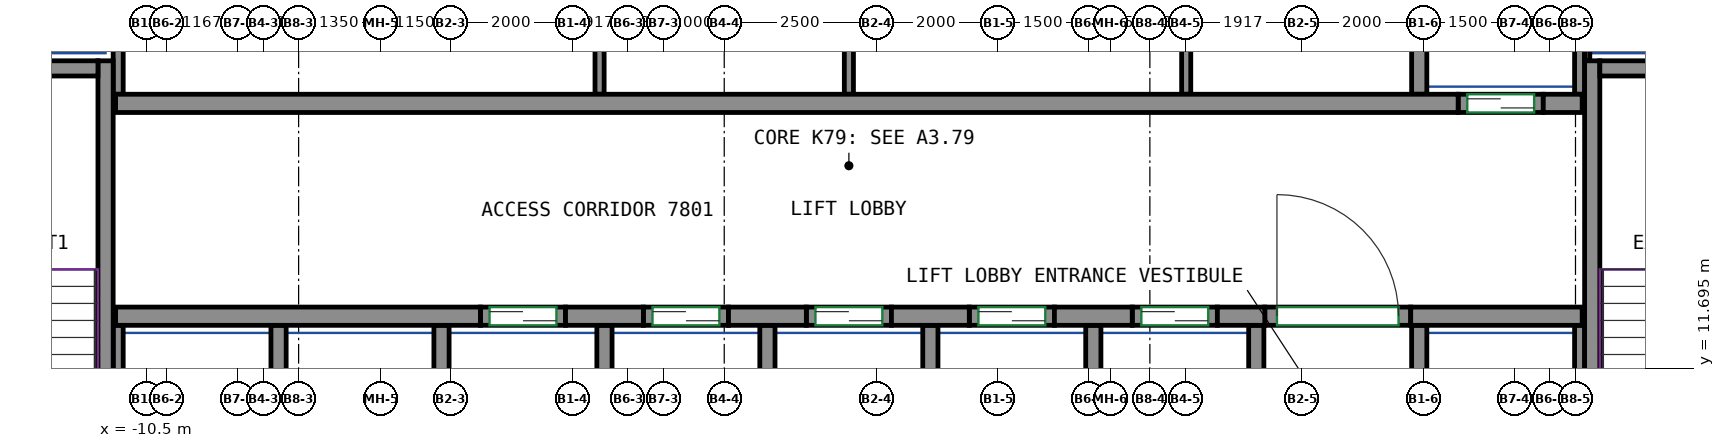
"""IFC4 building model, lengths in metres.
Left out: names, types, materials, properties, quantities, classifications, styles, units other than length and angle.
Written with IfcOpenShell. Run it as: python <this file> out.ifc"""

import sys

from ifc_helpers import new_model, si_unit, direction, frame, frame_2d, origin, place, context, subcontext, project, spatial, rectangle, extrude, source, transform, mapped, element, fill, save


model = new_model("IFC4")
c1 = context("Model", 3, precision=1e-05, world=origin(), true_north=direction((0.0, 1.0)))
c2 = subcontext(c1, "Body", "Model", "MODEL_VIEW")
j1 = project(units=[si_unit("LENGTHUNIT", "METRE"), si_unit("PLANEANGLEUNIT", "RADIAN")], contexts=[c1])
p1 = place(None, origin())
s1 = spatial("IfcSite", under=j1, at=p1, CompositionType="ELEMENT")
p2 = place(p1, origin())
s2 = spatial("IfcBuilding", under=s1, at=p2, CompositionType="ELEMENT")
p3 = place(p2, frame((0.0, 0.0, 312.0)))
s3 = spatial("IfcBuildingStorey", under=s2, at=p3, CompositionType="ELEMENT", Elevation=312.0)
m1 = source(origin(), c2, "Body", "SweptSolid", [
    extrude(rectangle(XDim=7.75, YDim=0.25, at=frame_2d((3.875, 0.0))), origin(), (0.0, 0.0, 1.0), 3.12),
])
p4 = place(p3, frame((-11.175, 9.0, 0.0), z_axis=(0.0, 0.0, 1.0), x_axis=(0.0, 1.0, 0.0)))
e1 = element("IfcWall", 1, at=p4, inside=s3, PredefinedType="SHEAR", context=c2, shape_type="MappedRepresentation", body=[
    mapped(m1, transform((0.0, 0.0, 0.0))),
])
m2 = source(origin(), c2, "Body", "SweptSolid", [
    extrude(rectangle(XDim=3.7, YDim=0.25, at=frame_2d((1.85, 0.0))), origin(), (0.0, 0.0, 1.0), 3.12),
])
p5 = place(p3, frame((-15.0, 16.625, 0.0), z_axis=(0.0, 0.0, 1.0), x_axis=(1.0, 0.0, 0.0)))
e2 = element("IfcWall", 2, at=p5, inside=s3, PredefinedType="SHEAR", context=c2, shape_type="MappedRepresentation", body=[
    mapped(m2, transform((0.0, 0.0, 0.0))),
])
p6 = place(p3, frame((13.275, 9.0, 0.0), z_axis=(0.0, 0.0, 1.0), x_axis=(0.0, 1.0, 0.0)))
e3 = element("IfcWall", 3, at=p6, inside=s3, PredefinedType="SHEAR", context=c2, shape_type="MappedRepresentation", body=[
    mapped(m1, transform((0.0, 0.0, 0.0))),
])
m3 = source(origin(), c2, "Body", "SweptSolid", [
    extrude(rectangle(XDim=3.7, YDim=0.25, at=frame_2d((1.85, 0.0))), origin(), (0.0, 0.0, 1.0), 3.12),
])
p7 = place(p3, frame((13.4, 16.625, 0.0), z_axis=(0.0, 0.0, 1.0), x_axis=(1.0, 0.0, 0.0)))
e4 = element("IfcWall", 4, at=p7, inside=s3, PredefinedType="SHEAR", context=c2, shape_type="MappedRepresentation", body=[
    mapped(m3, transform((0.0, 0.0, 0.0))),
])
m4 = source(origin(), c2, "Body", "SweptSolid", [
    extrude(rectangle(XDim=6.0, YDim=0.3, at=frame_2d((3.0, 0.0))), origin(), (0.0, 0.0, 1.0), 3.12),
])
p8 = place(p3, frame((-11.01, 12.55, 0.0), z_axis=(0.0, 0.0, 1.0), x_axis=(1.0, 0.0, 0.0)))
e5 = element("IfcWall", 5, at=p8, inside=s3, PredefinedType="SHEAR", context=c2, shape_type="MappedRepresentation", body=[
    mapped(m4, transform((0.0, 0.0, 0.0))),
])
m5 = source(origin(), c2, "Body", "SweptSolid", [
    extrude(rectangle(XDim=1.28, YDim=0.3, at=frame_2d((0.64, 0.0))), origin(), (0.0, 0.0, 1.0), 3.12),
])
for number, where, z_axis, x_axis in (
    (6, (-3.61, 12.55, 0.0), (0.0, 0.0, 1.0), (1.0, 0.0, 0.0)),
    (7, (-0.93, 12.55, 0.0), (0.0, 0.0, 1.0), (1.0, 0.0, 0.0)),
    (8, (1.75, 12.55, 0.0), (0.0, 0.0, 1.0), (1.0, 0.0, 0.0)),
    (9, (4.43, 12.55, 0.0), (0.0, 0.0, 1.0), (1.0, 0.0, 0.0)),
):
    element("IfcWall", number, at=place(p3, frame(where, z_axis=z_axis, x_axis=x_axis)), inside=s3, PredefinedType="SHEAR", context=c2, shape_type="MappedRepresentation", body=[
        mapped(m5, transform((0.0, 0.0, 0.0))),
    ])
m6 = source(origin(), c2, "Body", "SweptSolid", [
    extrude(rectangle(XDim=0.78, YDim=0.3, at=frame_2d((0.39, 0.0))), origin(), (0.0, 0.0, 1.0), 3.12),
])
p9 = place(p3, frame((7.11, 12.55, 0.0), z_axis=(0.0, 0.0, 1.0), x_axis=(1.0, 0.0, 0.0)))
e10 = element("IfcWall", 10, at=p9, inside=s3, PredefinedType="SHEAR", context=c2, shape_type="MappedRepresentation", body=[
    mapped(m6, transform((0.0, 0.0, 0.0))),
])
m7 = source(origin(), c2, "Body", "SweptSolid", [
    extrude(rectangle(XDim=2.82, YDim=0.3, at=frame_2d((1.41, 0.0))), origin(), (0.0, 0.0, 1.0), 3.12),
])
p10 = place(p3, frame((10.29, 12.55, 0.0), z_axis=(0.0, 0.0, 1.0), x_axis=(1.0, 0.0, 0.0)))
e11 = element("IfcWall", 11, at=p10, inside=s3, PredefinedType="SHEAR", context=c2, shape_type="MappedRepresentation", body=[
    mapped(m7, transform((0.0, 0.0, 0.0))),
])
m8 = source(origin(), c2, "Body", "SweptSolid", [
    extrude(rectangle(XDim=22.08, YDim=0.3, at=frame_2d((11.04, 0.0))), origin(), (0.0, 0.0, 1.0), 3.12),
])
p11 = place(p3, frame((-11.01, 16.05, 0.0), z_axis=(0.0, 0.0, 1.0), x_axis=(1.0, 0.0, 0.0)))
e12 = element("IfcWall", 12, at=p11, inside=s3, PredefinedType="SHEAR", context=c2, shape_type="MappedRepresentation", body=[
    mapped(m8, transform((0.0, 0.0, 0.0))),
])
m9 = source(origin(), c2, "Body", "SweptSolid", [
    extrude(rectangle(XDim=0.64, YDim=0.3, at=frame_2d((0.32, 0.0))), origin(), (0.0, 0.0, 1.0), 3.12),
])
p12 = place(p3, frame((12.47, 16.05, 0.0), z_axis=(0.0, 0.0, 1.0), x_axis=(1.0, 0.0, 0.0)))
e13 = element("IfcWall", 13, at=p12, inside=s3, PredefinedType="SHEAR", context=c2, shape_type="MappedRepresentation", body=[
    mapped(m9, transform((0.0, 0.0, 0.0))),
])
m10 = source(origin(), c2, "Body", "SweptSolid", [
    extrude(rectangle(XDim=1.4, YDim=0.3, at=frame_2d((0.7, 0.0))), origin(), (0.0, 0.0, 1.0), 3.12),
])
p13 = place(p3, frame((-5.01, 12.55, 0.0), z_axis=(0.0, 0.0, 1.0), x_axis=(1.0, 0.0, 0.0)))
e14 = element("IfcWall", 14, at=p13, inside=s3, PredefinedType="PARTITIONING", context=c2, shape_type="MappedRepresentation", body=[
    mapped(m10, transform((0.0, 0.0, 0.0))),
])
p14 = place(p13, frame((0.15, 0.0, 0.0)))
e15 = element("IfcOpeningElement", 15, at=p14, cuts=e14, PredefinedType="OPENING", context=c2, shape_type="SweptSolid", body=[
    extrude(rectangle(XDim=1.1, YDim=2.1, at=frame_2d((0.55, 1.05))), frame((0.0, 0.16, 0.0), z_axis=(0.0, -1.0, 0.0), x_axis=(1.0, 0.0, 0.0)), (0.0, 0.0, 1.0), 0.32),
])
m11 = source(origin(), c2, "Body", "SweptSolid", [
    extrude(rectangle(XDim=1.4, YDim=0.3, at=frame_2d((0.7, 0.0))), origin(), (0.0, 0.0, 1.0), 3.12),
])
p15 = place(p3, frame((-2.33, 12.55, 0.0), z_axis=(0.0, 0.0, 1.0), x_axis=(1.0, 0.0, 0.0)))
e16 = element("IfcWall", 16, at=p15, inside=s3, PredefinedType="PARTITIONING", context=c2, shape_type="MappedRepresentation", body=[
    mapped(m11, transform((0.0, 0.0, 0.0))),
])
p16 = place(p15, frame((0.15, 0.0, 0.0)))
e17 = element("IfcOpeningElement", 17, at=p16, cuts=e16, PredefinedType="OPENING", context=c2, shape_type="SweptSolid", body=[
    extrude(rectangle(XDim=1.1, YDim=2.1, at=frame_2d((0.55, 1.05))), frame((0.0, 0.16, 0.0), z_axis=(0.0, -1.0, 0.0), x_axis=(1.0, 0.0, 0.0)), (0.0, 0.0, 1.0), 0.32),
])
p17 = place(p3, frame((0.35, 12.55, 0.0), z_axis=(0.0, 0.0, 1.0), x_axis=(1.0, 0.0, 0.0)))
e18 = element("IfcWall", 18, at=p17, inside=s3, PredefinedType="PARTITIONING", context=c2, shape_type="MappedRepresentation", body=[
    mapped(m10, transform((0.0, 0.0, 0.0))),
])
p18 = place(p17, frame((0.15, 0.0, 0.0)))
e19 = element("IfcOpeningElement", 19, at=p18, cuts=e18, PredefinedType="OPENING", context=c2, shape_type="SweptSolid", body=[
    extrude(rectangle(XDim=1.1, YDim=2.1, at=frame_2d((0.55, 1.05))), frame((0.0, 0.16, 0.0), z_axis=(0.0, -1.0, 0.0), x_axis=(1.0, 0.0, 0.0)), (0.0, 0.0, 1.0), 0.32),
])
p19 = place(p3, frame((3.03, 12.55, 0.0), z_axis=(0.0, 0.0, 1.0), x_axis=(1.0, 0.0, 0.0)))
e20 = element("IfcWall", 20, at=p19, inside=s3, PredefinedType="PARTITIONING", context=c2, shape_type="MappedRepresentation", body=[
    mapped(m10, transform((0.0, 0.0, 0.0))),
])
p20 = place(p19, frame((0.15, 0.0, 0.0)))
e21 = element("IfcOpeningElement", 21, at=p20, cuts=e20, PredefinedType="OPENING", context=c2, shape_type="SweptSolid", body=[
    extrude(rectangle(XDim=1.1, YDim=2.1, at=frame_2d((0.55, 1.05))), frame((0.0, 0.16, 0.0), z_axis=(0.0, -1.0, 0.0), x_axis=(1.0, 0.0, 0.0)), (0.0, 0.0, 1.0), 0.32),
])
p21 = place(p3, frame((5.71, 12.55, 0.0), z_axis=(0.0, 0.0, 1.0), x_axis=(1.0, 0.0, 0.0)))
e22 = element("IfcWall", 22, at=p21, inside=s3, PredefinedType="PARTITIONING", context=c2, shape_type="MappedRepresentation", body=[
    mapped(m11, transform((0.0, 0.0, 0.0))),
])
p22 = place(p21, frame((0.15, 0.0, 0.0)))
e23 = element("IfcOpeningElement", 23, at=p22, cuts=e22, PredefinedType="OPENING", context=c2, shape_type="SweptSolid", body=[
    extrude(rectangle(XDim=1.1, YDim=2.1, at=frame_2d((0.55, 1.05))), frame((0.0, 0.16, 0.0), z_axis=(0.0, -1.0, 0.0), x_axis=(1.0, 0.0, 0.0)), (0.0, 0.0, 1.0), 0.32),
])
p23 = place(p3, frame((11.07, 16.05, 0.0), z_axis=(0.0, 0.0, 1.0), x_axis=(1.0, 0.0, 0.0)))
e24 = element("IfcWall", 24, at=p23, inside=s3, PredefinedType="PARTITIONING", context=c2, shape_type="MappedRepresentation", body=[
    mapped(m10, transform((0.0, 0.0, 0.0))),
])
p24 = place(p23, frame((0.15, 0.0, 0.0)))
e25 = element("IfcOpeningElement", 25, at=p24, cuts=e24, PredefinedType="OPENING", context=c2, shape_type="SweptSolid", body=[
    extrude(rectangle(XDim=1.1, YDim=2.1, at=frame_2d((0.55, 1.05))), frame((0.0, 0.16, 0.0), z_axis=(0.0, -1.0, 0.0), x_axis=(1.0, 0.0, 0.0)), (0.0, 0.0, 1.0), 0.32),
])
m12 = source(origin(), c2, "Body", "SweptSolid", [
    extrude(rectangle(XDim=2.4, YDim=0.3, at=frame_2d((1.2, 0.0))), origin(), (0.0, 0.0, 1.0), 3.12),
])
p25 = place(p3, frame((7.89, 12.55, 0.0), z_axis=(0.0, 0.0, 1.0), x_axis=(1.0, 0.0, 0.0)))
e26 = element("IfcWall", 26, at=p25, inside=s3, PredefinedType="PARTITIONING", context=c2, shape_type="MappedRepresentation", body=[
    mapped(m12, transform((0.0, 0.0, 0.0))),
])
p26 = place(p25, frame((0.2, 0.0, 0.0)))
e27 = element("IfcOpeningElement", 27, at=p26, cuts=e26, PredefinedType="OPENING", context=c2, shape_type="SweptSolid", body=[
    extrude(rectangle(XDim=2.0, YDim=2.1, at=frame_2d((1.0, 1.05))), frame((0.0, 0.16, 0.0), z_axis=(0.0, -1.0, 0.0), x_axis=(1.0, 0.0, 0.0)), (0.0, 0.0, 1.0), 0.32),
])
m13 = source(origin(), c2, "Body", "SweptSolid", [
    extrude(rectangle(XDim=3.275, YDim=0.165, at=frame_2d((1.638, 0.0))), origin(), (0.0, 0.0, 1.0), 3.12),
])
p27 = place(p3, frame((13.067, 16.2, 0.0), z_axis=(0.0, 0.0, 1.0), x_axis=(0.0, 1.0, 0.0)))
e28 = element("IfcWall", 28, at=p27, inside=s3, PredefinedType="PARTITIONING", context=c2, shape_type="MappedRepresentation", body=[
    mapped(m13, transform((0.0, 0.0, 0.0))),
])
m14 = source(origin(), c2, "Body", "SweptSolid", [
    extrude(rectangle(XDim=4.8, YDim=0.165, at=frame_2d((2.4, 0.0))), origin(), (0.0, 0.0, 1.0), 3.12),
])
p28 = place(p3, frame((-10.968, 16.2, 0.0), z_axis=(0.0, 0.0, 1.0), x_axis=(0.0, 1.0, 0.0)))
e29 = element("IfcWall", 29, at=p28, inside=s3, PredefinedType="PARTITIONING", context=c2, shape_type="MappedRepresentation", body=[
    mapped(m14, transform((0.0, 0.0, 0.0))),
])
m15 = source(origin(), c2, "Body", "SweptSolid", [
    extrude(rectangle(XDim=3.275, YDim=0.25, at=frame_2d((1.638, 0.0))), origin(), (0.0, 0.0, 1.0), 3.12),
])
p29 = place(p3, frame((10.43, 16.2, 0.0), z_axis=(0.0, 0.0, 1.0), x_axis=(0.0, 1.0, 0.0)))
e30 = element("IfcWall", 30, at=p29, inside=s3, PredefinedType="PARTITIONING", context=c2, shape_type="MappedRepresentation", body=[
    mapped(m15, transform((0.0, 0.0, 0.0))),
])
m16 = source(origin(), c2, "Body", "SweptSolid", [
    extrude(rectangle(XDim=2.725, YDim=0.085, at=frame_2d((1.363, 0.0))), origin(), (0.0, 0.0, 1.0), 3.12),
])
p30 = place(p3, frame((13.192, 16.75, 0.0), z_axis=(0.0, 0.0, 1.0), x_axis=(0.0, 1.0, 0.0)))
e31 = element("IfcWall", 31, at=p30, inside=s3, PredefinedType="PARTITIONING", context=c2, shape_type="MappedRepresentation", body=[
    mapped(m16, transform((0.0, 0.0, 0.0))),
])
m17 = source(origin(), c2, "Body", "SweptSolid", [
    extrude(rectangle(XDim=3.4, YDim=0.25, at=frame_2d((1.7, 0.0))), origin(), (0.0, 0.0, 1.0), 3.12),
])
p31 = place(p3, frame((10.43, 9.0, 0.0), z_axis=(0.0, 0.0, 1.0), x_axis=(0.0, 1.0, 0.0)))
e32 = element("IfcWall", 32, at=p31, inside=s3, PredefinedType="PARTITIONING", context=c2, shape_type="MappedRepresentation", body=[
    mapped(m17, transform((0.0, 0.0, 0.0))),
])
m18 = source(origin(), c2, "Body", "SweptSolid", [
    extrude(rectangle(XDim=3.4, YDim=0.165, at=frame_2d((1.7, 0.0))), origin(), (0.0, 0.0, 1.0), 3.12),
])
p32 = place(p3, frame((13.067, 9.0, 0.0), z_axis=(0.0, 0.0, 1.0), x_axis=(0.0, 1.0, 0.0)))
e33 = element("IfcWall", 33, at=p32, inside=s3, PredefinedType="PARTITIONING", context=c2, shape_type="MappedRepresentation", body=[
    mapped(m18, transform((0.0, 0.0, 0.0))),
])
for number, where, z_axis, x_axis in (
    (34, (2.39, 9.0, 0.0), (0.0, 0.0, 1.0), (0.0, 1.0, 0.0)),
    (35, (5.07, 9.0, 0.0), (0.0, 0.0, 1.0), (0.0, 1.0, 0.0)),
    (36, (7.75, 9.0, 0.0), (0.0, 0.0, 1.0), (0.0, 1.0, 0.0)),
    (37, (-0.29, 9.0, 0.0), (0.0, 0.0, 1.0), (0.0, 1.0, 0.0)),
):
    element("IfcWall", number, at=place(p3, frame(where, z_axis=z_axis, x_axis=x_axis)), inside=s3, PredefinedType="PARTITIONING", context=c2, shape_type="MappedRepresentation", body=[
        mapped(m17, transform((0.0, 0.0, 0.0))),
    ])
p33 = place(p3, frame((-10.968, 9.0, 0.0), z_axis=(0.0, 0.0, 1.0), x_axis=(0.0, 1.0, 0.0)))
e38 = element("IfcWall", 38, at=p33, inside=s3, PredefinedType="PARTITIONING", context=c2, shape_type="MappedRepresentation", body=[
    mapped(m18, transform((0.0, 0.0, 0.0))),
])
for number, where, z_axis, x_axis in (
    (39, (-2.97, 9.0, 0.0), (0.0, 0.0, 1.0), (0.0, 1.0, 0.0)),
    (40, (-5.65, 9.0, 0.0), (0.0, 0.0, 1.0), (0.0, 1.0, 0.0)),
    (41, (-8.33, 9.0, 0.0), (0.0, 0.0, 1.0), (0.0, 1.0, 0.0)),
):
    element("IfcWall", number, at=place(p3, frame(where, z_axis=z_axis, x_axis=x_axis)), inside=s3, PredefinedType="PARTITIONING", context=c2, shape_type="MappedRepresentation", body=[
        mapped(m17, transform((0.0, 0.0, 0.0))),
    ])
m19 = source(origin(), c2, "Body", "SweptSolid", [
    extrude(rectangle(XDim=4.8, YDim=0.15, at=frame_2d((2.4, 0.0))), origin(), (0.0, 0.0, 1.0), 3.12),
])
for number, where, z_axis, x_axis in (
    (42, (-3.05, 16.2, 0.0), (0.0, 0.0, 1.0), (0.0, 1.0, 0.0)),
    (43, (1.05, 16.2, 0.0), (0.0, 0.0, 1.0), (0.0, 1.0, 0.0)),
    (44, (6.598, 16.2, 0.0), (0.0, 0.0, 1.0), (0.0, 1.0, 0.0)),
):
    element("IfcWall", number, at=place(p3, frame(where, z_axis=z_axis, x_axis=x_axis)), inside=s3, PredefinedType="PARTITIONING", context=c2, shape_type="MappedRepresentation", body=[
        mapped(m19, transform((0.0, 0.0, 0.0))),
    ])
p34 = place(p26, origin())
e45 = element("IfcDoor", 45, at=p34, inside=s3, OperationType="DOUBLE_DOOR_SINGLE_SWING", PredefinedType="DOOR", context=c2, shape_type="SweptSolid", body=[
    extrude(rectangle(XDim=2.0, YDim=2.1, at=frame_2d((1.0, 1.05))), frame((0.0, 0.025, 0.0), z_axis=(0.0, -1.0, 0.0), x_axis=(1.0, 0.0, 0.0)), (0.0, 0.0, 1.0), 0.05),
])
fill(e27, e45)
p35 = place(p14, origin())
e46 = element("IfcDoor", 46, at=p35, inside=s3, OperationType="DOUBLE_DOOR_SLIDING", PredefinedType="DOOR", context=c2, shape_type="SweptSolid", body=[
    extrude(rectangle(XDim=1.1, YDim=2.1, at=frame_2d((0.55, 1.05))), frame((0.0, 0.025, 0.0), z_axis=(0.0, -1.0, 0.0), x_axis=(1.0, 0.0, 0.0)), (0.0, 0.0, 1.0), 0.05),
])
fill(e15, e46)
p36 = place(p16, origin())
e47 = element("IfcDoor", 47, at=p36, inside=s3, OperationType="DOUBLE_DOOR_SLIDING", PredefinedType="DOOR", context=c2, shape_type="SweptSolid", body=[
    extrude(rectangle(XDim=1.1, YDim=2.1, at=frame_2d((0.55, 1.05))), frame((0.0, 0.025, 0.0), z_axis=(0.0, -1.0, 0.0), x_axis=(1.0, 0.0, 0.0)), (0.0, 0.0, 1.0), 0.05),
])
fill(e17, e47)
p37 = place(p18, origin())
e48 = element("IfcDoor", 48, at=p37, inside=s3, OperationType="DOUBLE_DOOR_SLIDING", PredefinedType="DOOR", context=c2, shape_type="SweptSolid", body=[
    extrude(rectangle(XDim=1.1, YDim=2.1, at=frame_2d((0.55, 1.05))), frame((0.0, 0.025, 0.0), z_axis=(0.0, -1.0, 0.0), x_axis=(1.0, 0.0, 0.0)), (0.0, 0.0, 1.0), 0.05),
])
fill(e19, e48)
p38 = place(p20, origin())
e49 = element("IfcDoor", 49, at=p38, inside=s3, OperationType="DOUBLE_DOOR_SLIDING", PredefinedType="DOOR", context=c2, shape_type="SweptSolid", body=[
    extrude(rectangle(XDim=1.1, YDim=2.1, at=frame_2d((0.55, 1.05))), frame((0.0, 0.025, 0.0), z_axis=(0.0, -1.0, 0.0), x_axis=(1.0, 0.0, 0.0)), (0.0, 0.0, 1.0), 0.05),
])
fill(e21, e49)
p39 = place(p22, origin())
e50 = element("IfcDoor", 50, at=p39, inside=s3, OperationType="DOUBLE_DOOR_SLIDING", PredefinedType="DOOR", context=c2, shape_type="SweptSolid", body=[
    extrude(rectangle(XDim=1.1, YDim=2.1, at=frame_2d((0.55, 1.05))), frame((0.0, 0.025, 0.0), z_axis=(0.0, -1.0, 0.0), x_axis=(1.0, 0.0, 0.0)), (0.0, 0.0, 1.0), 0.05),
])
fill(e23, e50)
p40 = place(p24, origin())
e51 = element("IfcDoor", 51, at=p40, inside=s3, OperationType="DOUBLE_DOOR_SLIDING", PredefinedType="DOOR", context=c2, shape_type="SweptSolid", body=[
    extrude(rectangle(XDim=1.1, YDim=2.1, at=frame_2d((0.55, 1.05))), frame((0.0, 0.025, 0.0), z_axis=(0.0, -1.0, 0.0), x_axis=(1.0, 0.0, 0.0)), (0.0, 0.0, 1.0), 0.05),
])
fill(e25, e51)
save(model, sys.argv[1])
